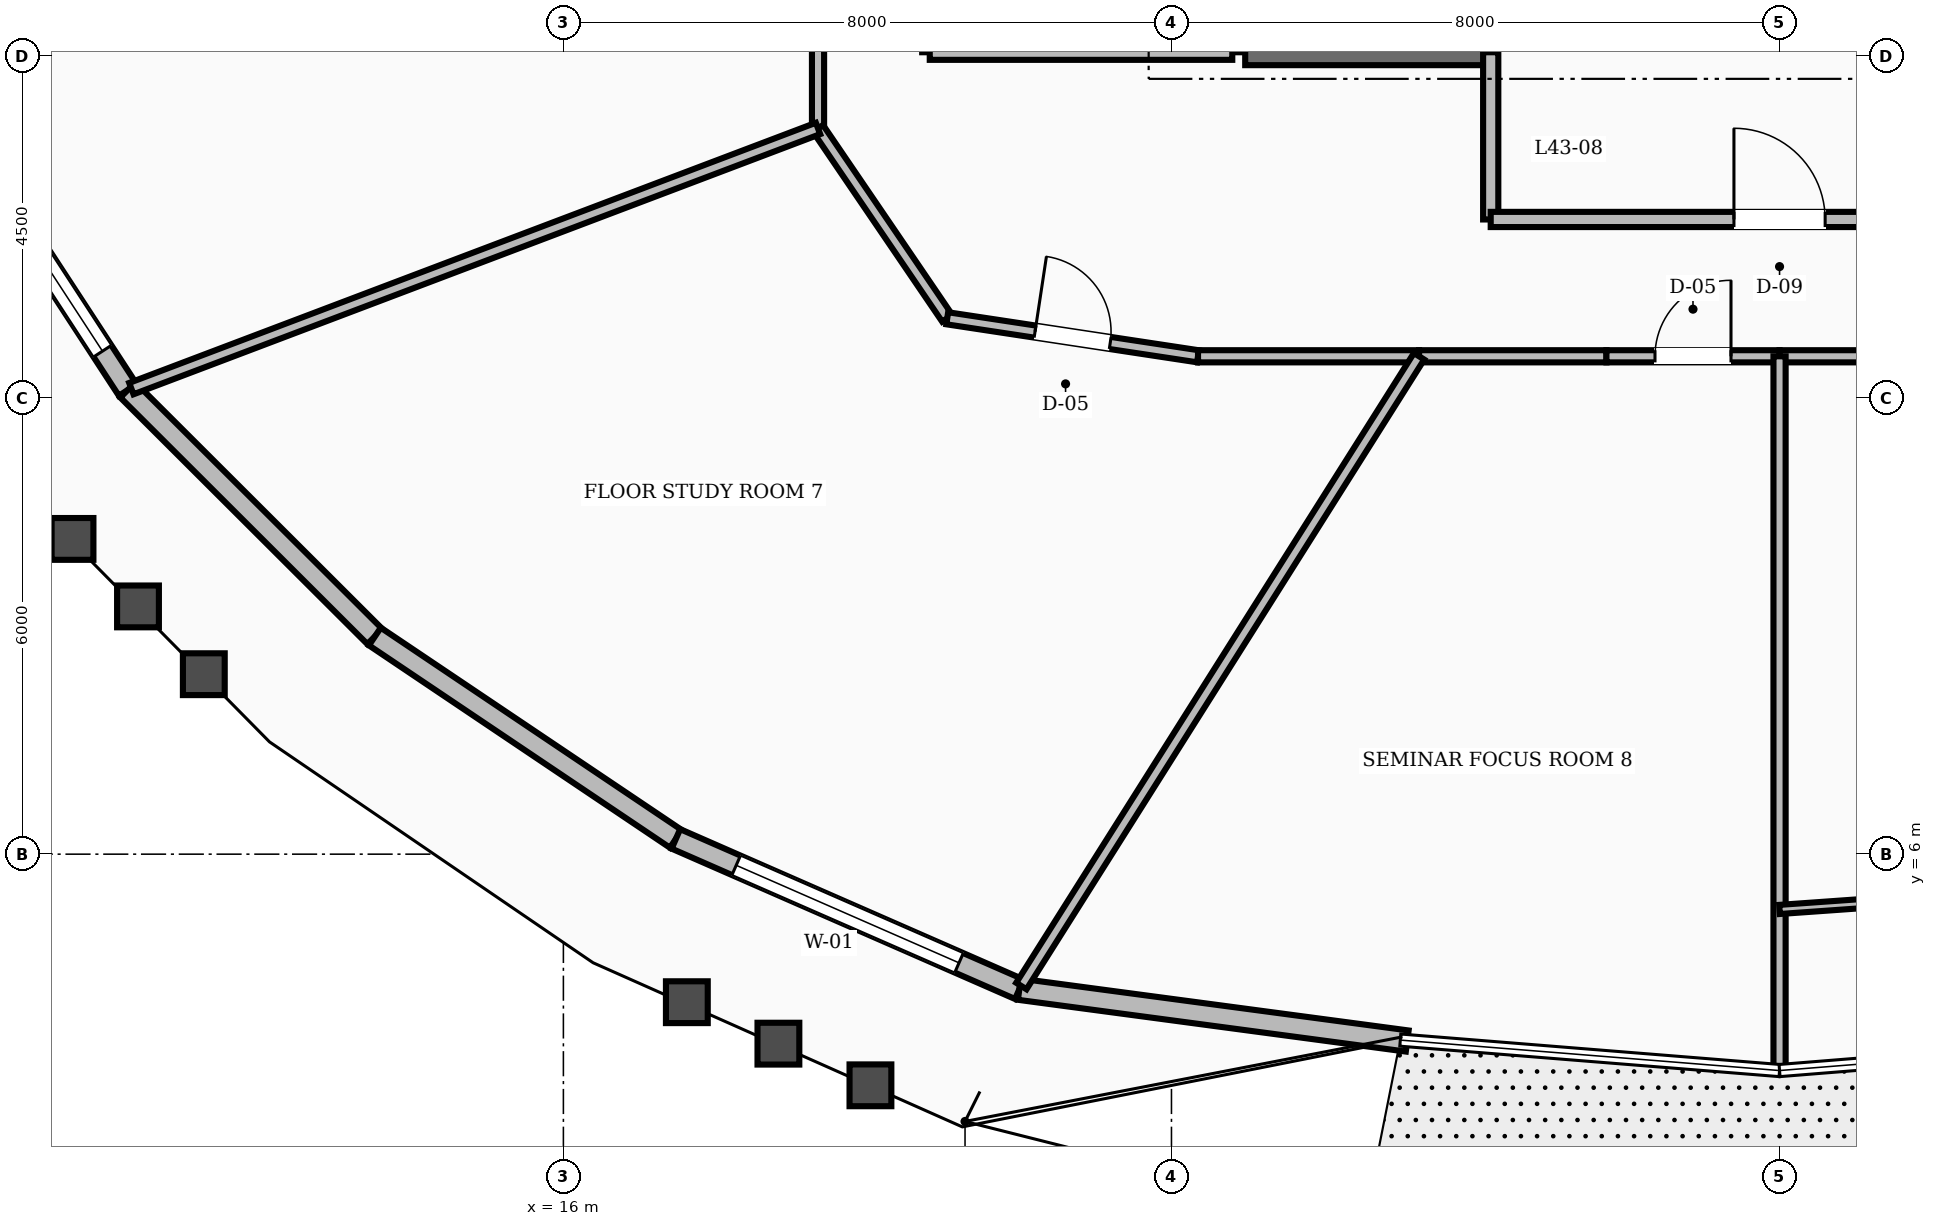
"""IFC4 building model, lengths in metres.
Left out: names, types, materials, properties, quantities, classifications, styles, units other than length and angle.
Written with IfcOpenShell. Run it as: python <this file> out.ifc"""

import sys

from ifc_helpers import new_model, si_unit, direction, frame, frame_2d, origin, place, context, subcontext, project, spatial, rectangle, extrude, element, fill, save


model = new_model("IFC4")
c1 = context("Model", 3, precision=1e-05, world=origin(), true_north=direction((0.0, 1.0)))
c2 = subcontext(c1, "Body", "Model", "MODEL_VIEW")
j1 = project(units=[si_unit("LENGTHUNIT", "METRE"), si_unit("PLANEANGLEUNIT", "RADIAN")], contexts=[c1])
p1 = place(None, origin())
s1 = spatial("IfcSite", under=j1, at=p1, CompositionType="ELEMENT")
p2 = place(p1, origin())
s2 = spatial("IfcBuilding", under=s1, at=p2, CompositionType="ELEMENT")
p3 = place(p2, frame((0.0, 0.0, 167.6)))
s3 = spatial("IfcBuildingStorey", under=s2, at=p3, CompositionType="ELEMENT", Elevation=167.6)
p4 = place(p3, frame((24.97, 16.55, 0.0), z_axis=(0.0, 0.0, 1.0), x_axis=(1.0, 0.0, 0.0)))
e1 = element("IfcWall", 1, at=p4, inside=s3, PredefinedType="SHEAR", context=c2, shape_type="SweptSolid", body=[
    extrude(rectangle(XDim=3.23, YDim=0.34, at=frame_2d((1.615, 0.0))), origin(), (0.0, 0.0, 1.0), 3.6),
])
p5 = place(p3, frame((7.854, 15.808, 0.0), z_axis=(0.0, 0.0, 1.0), x_axis=(0.546488523779, -0.837466592395, 0.0)))
e2 = element("IfcWall", 2, at=p5, inside=s3, PredefinedType="STANDARD", context=c2, shape_type="SweptSolid", body=[
    extrude(rectangle(XDim=4.419, YDim=0.28, at=frame_2d((2.209, 0.0))), origin(), (0.0, 0.0, 1.0), 2.82),
])
p6 = place(p5, frame((0.61, 0.0, 0.8)))
e3 = element("IfcOpeningElement", 3, at=p6, cuts=e2, PredefinedType="OPENING", context=c2, shape_type="SweptSolid", body=[
    extrude(rectangle(XDim=3.2, YDim=1.65, at=frame_2d((1.6, 0.825))), frame((0.0, 0.15, 0.0), z_axis=(0.0, -1.0, 0.0), x_axis=(1.0, 0.0, 0.0)), (0.0, 0.0, 1.0), 0.3),
])
p7 = place(p3, frame((10.269, 12.107, 0.0), z_axis=(0.0, 0.0, 1.0), x_axis=(0.707797600077, -0.706415286729, 0.0)))
e4 = element("IfcWall", 4, at=p7, inside=s3, PredefinedType="STANDARD", context=c2, shape_type="SweptSolid", body=[
    extrude(rectangle(XDim=4.592, YDim=0.28, at=frame_2d((2.296, 0.0))), origin(), (0.0, 0.0, 1.0), 2.82),
])
p8 = place(p3, frame((13.52, 8.863, 0.0), z_axis=(0.0, 0.0, 1.0), x_axis=(0.829911180813, -0.557895538575, 0.0)))
e5 = element("IfcWall", 5, at=p8, inside=s3, PredefinedType="STANDARD", context=c2, shape_type="SweptSolid", body=[
    extrude(rectangle(XDim=4.772, YDim=0.28, at=frame_2d((2.386, 0.0))), origin(), (0.0, 0.0, 1.0), 2.82),
])
p9 = place(p3, frame((17.48, 6.201, 0.0), z_axis=(0.0, 0.0, 1.0), x_axis=(0.916070979736, -0.401016159381, 0.0)))
e6 = element("IfcWall", 6, at=p9, inside=s3, PredefinedType="STANDARD", context=c2, shape_type="SweptSolid", body=[
    extrude(rectangle(XDim=4.933, YDim=0.28, at=frame_2d((2.466, 0.0))), origin(), (0.0, 0.0, 1.0), 2.82),
])
p10 = place(p9, frame((0.866, 0.0, 0.8)))
e7 = element("IfcOpeningElement", 7, at=p10, cuts=e6, PredefinedType="OPENING", context=c2, shape_type="SweptSolid", body=[
    extrude(rectangle(XDim=3.2, YDim=1.65, at=frame_2d((1.6, 0.825))), frame((0.0, 0.15, 0.0), z_axis=(0.0, -1.0, 0.0), x_axis=(1.0, 0.0, 0.0)), (0.0, 0.0, 1.0), 0.3),
])
p11 = place(p3, frame((21.999, 4.223, 0.0), z_axis=(0.0, 0.0, 1.0), x_axis=(0.991209668923, -0.13230038637, 0.0)))
e8 = element("IfcWall", 8, at=p11, inside=s3, PredefinedType="STANDARD", context=c2, shape_type="SweptSolid", body=[
    extrude(rectangle(XDim=5.148, YDim=0.28, at=frame_2d((2.574, 0.0))), origin(), (0.0, 0.0, 1.0), 2.82),
])
p12 = place(p3, frame((20.82, 16.55, 0.0), z_axis=(0.0, 0.0, 1.0), x_axis=(1.0, 0.0, 0.0)))
e9 = element("IfcWall", 9, at=p12, inside=s3, PredefinedType="SOLIDWALL", context=c2, shape_type="SweptSolid", body=[
    extrude(rectangle(XDim=3.98, YDim=0.2, at=frame_2d((1.99, 0.0))), origin(), (0.0, 0.0, 1.0), 2.8),
])
p13 = place(p3, frame((28.2, 14.35, 0.0), z_axis=(0.0, 0.0, 1.0), x_axis=(0.0, 1.0, 0.0)))
e10 = element("IfcWall", 10, at=p13, inside=s3, PredefinedType="SOLIDWALL", context=c2, shape_type="SweptSolid", body=[
    extrude(rectangle(XDim=2.2, YDim=0.2, at=frame_2d((1.1, 0.0))), origin(), (0.0, 0.0, 1.0), 2.8),
])
p14 = place(p3, frame((28.2, 14.35, 0.0), z_axis=(0.0, 0.0, 1.0), x_axis=(1.0, 0.0, 0.0)))
e11 = element("IfcWall", 11, at=p14, inside=s3, PredefinedType="SOLIDWALL", context=c2, shape_type="SweptSolid", body=[
    extrude(rectangle(XDim=7.6, YDim=0.2, at=frame_2d((3.8, 0.0))), origin(), (0.0, 0.0, 1.0), 2.8),
])
p15 = place(p14, frame((3.2, 0.0, 0.0)))
e12 = element("IfcOpeningElement", 12, at=p15, cuts=e11, PredefinedType="OPENING", context=c2, shape_type="SweptSolid", body=[
    extrude(rectangle(XDim=1.2, YDim=2.1, at=frame_2d((0.6, 1.05))), frame((0.0, 0.11, 0.0), z_axis=(0.0, -1.0, 0.0), x_axis=(1.0, 0.0, 0.0)), (0.0, 0.0, 1.0), 0.22),
])
p16 = place(p3, frame((19.35, 18.76, 0.0), z_axis=(0.0, 0.0, 1.0), x_axis=(0.0, -1.0, 0.0)))
e13 = element("IfcWall", 13, at=p16, inside=s3, PredefinedType="SOLIDWALL", context=c2, shape_type="SweptSolid", body=[
    extrude(rectangle(XDim=3.213, YDim=0.16, at=frame_2d((1.606, 0.0))), origin(), (0.0, 0.0, 1.0), 2.8),
])
p17 = place(p3, frame((19.35, 15.548, 0.0), z_axis=(0.0, 0.0, 1.0), x_axis=(0.562674669208, -0.826678423955, 0.0)))
e14 = element("IfcWall", 14, at=p17, inside=s3, PredefinedType="SOLIDWALL", context=c2, shape_type="SweptSolid", body=[
    extrude(rectangle(XDim=3.021, YDim=0.16, at=frame_2d((1.511, 0.0))), origin(), (0.0, 0.0, 1.0), 2.8),
])
p18 = place(p3, frame((21.05, 13.05, 0.0), z_axis=(0.0, 0.0, 1.0), x_axis=(0.988710906508, -0.149835721217, 0.0)))
e15 = element("IfcWall", 15, at=p18, inside=s3, PredefinedType="SOLIDWALL", context=c2, shape_type="SweptSolid", body=[
    extrude(rectangle(XDim=3.337, YDim=0.16, at=frame_2d((1.668, 0.0))), origin(), (0.0, 0.0, 1.0), 2.8),
])
p19 = place(p18, frame((1.168, 0.0, 0.0)))
e16 = element("IfcOpeningElement", 16, at=p19, cuts=e15, PredefinedType="OPENING", context=c2, shape_type="SweptSolid", body=[
    extrude(rectangle(XDim=1.0, YDim=2.1, at=frame_2d((0.5, 1.05))), frame((0.0, 0.09, 0.0), z_axis=(0.0, -1.0, 0.0), x_axis=(1.0, 0.0, 0.0)), (0.0, 0.0, 1.0), 0.18),
])
p20 = place(p3, frame((24.349, 12.55, 0.0), z_axis=(0.0, 0.0, 1.0), x_axis=(1.0, 0.0, 0.0)))
e17 = element("IfcWall", 17, at=p20, inside=s3, PredefinedType="SOLIDWALL", context=c2, shape_type="SweptSolid", body=[
    extrude(rectangle(XDim=2.908, YDim=0.16, at=frame_2d((1.454, 0.0))), origin(), (0.0, 0.0, 1.0), 2.8),
])
p21 = place(p3, frame((27.257, 12.55, 0.0), z_axis=(0.0, 0.0, 1.0), x_axis=(1.0, 0.0, 0.0)))
e18 = element("IfcWall", 18, at=p21, inside=s3, PredefinedType="SOLIDWALL", context=c2, shape_type="SweptSolid", body=[
    extrude(rectangle(XDim=2.465, YDim=0.16, at=frame_2d((1.232, 0.0))), origin(), (0.0, 0.0, 1.0), 2.8),
])
p22 = place(p3, frame((29.722, 12.55, 0.0), z_axis=(0.0, 0.0, 1.0), x_axis=(1.0, 0.0, 0.0)))
e19 = element("IfcWall", 19, at=p22, inside=s3, PredefinedType="SOLIDWALL", context=c2, shape_type="SweptSolid", body=[
    extrude(rectangle(XDim=2.278, YDim=0.16, at=frame_2d((1.139, 0.0))), origin(), (0.0, 0.0, 1.0), 2.8),
])
p23 = place(p22, frame((0.639, 0.0, 0.0)))
e20 = element("IfcOpeningElement", 20, at=p23, cuts=e19, PredefinedType="OPENING", context=c2, shape_type="SweptSolid", body=[
    extrude(rectangle(XDim=1.0, YDim=2.1, at=frame_2d((0.5, 1.05))), frame((0.0, 0.09, 0.0), z_axis=(0.0, -1.0, 0.0), x_axis=(1.0, 0.0, 0.0)), (0.0, 0.0, 1.0), 0.18),
])
p24 = place(p3, frame((32.0, 12.55, 0.0), z_axis=(0.0, 0.0, 1.0), x_axis=(1.0, 0.0, 0.0)))
e21 = element("IfcWall", 21, at=p24, inside=s3, PredefinedType="SOLIDWALL", context=c2, shape_type="SweptSolid", body=[
    extrude(rectangle(XDim=2.278, YDim=0.16, at=frame_2d((1.139, 0.0))), origin(), (0.0, 0.0, 1.0), 2.8),
])
p25 = place(p3, frame((19.35, 15.548, 0.0), z_axis=(0.0, 0.0, 1.0), x_axis=(-0.935128365782, -0.354309101647, 0.0)))
e22 = element("IfcWall", 22, at=p25, inside=s3, PredefinedType="SOLIDWALL", context=c2, shape_type="SweptSolid", body=[
    extrude(rectangle(XDim=9.661, YDim=0.16, at=frame_2d((4.83, 0.0))), origin(), (0.0, 0.0, 1.0), 2.8),
])
p26 = place(p3, frame((27.257, 12.55, 0.0), z_axis=(0.0, 0.0, 1.0), x_axis=(-0.53396393122, -0.845507256122, 0.0)))
e23 = element("IfcWall", 23, at=p26, inside=s3, PredefinedType="SOLIDWALL", context=c2, shape_type="SweptSolid", body=[
    extrude(rectangle(XDim=9.799, YDim=0.16, at=frame_2d((4.899, 0.0))), origin(), (0.0, 0.0, 1.0), 2.8),
])
p27 = place(p3, frame((32.0, 12.55, 0.0), z_axis=(0.0, 0.0, 1.0), x_axis=(0.0, -1.0, 0.0)))
e24 = element("IfcWall", 24, at=p27, inside=s3, PredefinedType="SOLIDWALL", context=c2, shape_type="SweptSolid", body=[
    extrude(rectangle(XDim=9.347, YDim=0.16, at=frame_2d((4.673, 0.0))), origin(), (0.0, 0.0, 1.0), 2.8),
])
p28 = place(p3, frame((32.0, 5.273, 0.0), z_axis=(0.0, 0.0, 1.0), x_axis=(0.997497239471, 0.070705425875, 0.0)))
e25 = element("IfcWall", 25, at=p28, inside=s3, PredefinedType="PARTITIONING", context=c2, shape_type="SweptSolid", body=[
    extrude(rectangle(XDim=4.389, YDim=0.12, at=frame_2d((2.194, 0.0))), origin(), (0.0, 0.0, 1.0), 2.8),
])
p29 = place(p28, frame((1.719, 0.0, 0.0)))
e26 = element("IfcOpeningElement", 26, at=p29, cuts=e25, PredefinedType="OPENING", context=c2, shape_type="SweptSolid", body=[
    extrude(rectangle(XDim=0.95, YDim=2.1, at=frame_2d((0.475, 1.05))), frame((0.0, 0.07, 0.0), z_axis=(0.0, -1.0, 0.0), x_axis=(1.0, 0.0, 0.0)), (0.0, 0.0, 1.0), 0.14),
])
p30 = place(p6, origin())
e27 = element("IfcWindow", 27, at=p30, inside=s3, PartitioningType="SINGLE_PANEL", PredefinedType="WINDOW", context=c2, shape_type="SweptSolid", body=[
    extrude(rectangle(XDim=3.2, YDim=1.65, at=frame_2d((1.6, 0.825))), frame((0.0, 0.03, 0.0), z_axis=(0.0, -1.0, 0.0), x_axis=(1.0, 0.0, 0.0)), (0.0, 0.0, 1.0), 0.06),
])
fill(e3, e27)
p31 = place(p10, origin())
e28 = element("IfcWindow", 28, at=p31, inside=s3, PartitioningType="SINGLE_PANEL", PredefinedType="WINDOW", context=c2, shape_type="SweptSolid", body=[
    extrude(rectangle(XDim=3.2, YDim=1.65, at=frame_2d((1.6, 0.825))), frame((0.0, 0.03, 0.0), z_axis=(0.0, -1.0, 0.0), x_axis=(1.0, 0.0, 0.0)), (0.0, 0.0, 1.0), 0.06),
])
fill(e7, e28)
p32 = place(p15, origin())
e29 = element("IfcDoor", 29, at=p32, inside=s3, OperationType="SINGLE_SWING_LEFT", PredefinedType="DOOR", context=c2, shape_type="SweptSolid", body=[
    extrude(rectangle(XDim=1.2, YDim=2.1, at=frame_2d((0.6, 1.05))), frame((0.0, 0.025, 0.0), z_axis=(0.0, -1.0, 0.0), x_axis=(1.0, 0.0, 0.0)), (0.0, 0.0, 1.0), 0.05),
])
fill(e12, e29)
p33 = place(p19, origin())
e30 = element("IfcDoor", 30, at=p33, inside=s3, OperationType="SINGLE_SWING_LEFT", PredefinedType="DOOR", context=c2, shape_type="SweptSolid", body=[
    extrude(rectangle(XDim=1.0, YDim=2.1, at=frame_2d((0.5, 1.05))), frame((0.0, 0.025, 0.0), z_axis=(0.0, -1.0, 0.0), x_axis=(1.0, 0.0, 0.0)), (0.0, 0.0, 1.0), 0.05),
])
fill(e16, e30)
p34 = place(p23, origin())
e31 = element("IfcDoor", 31, at=p34, inside=s3, OperationType="SINGLE_SWING_RIGHT", PredefinedType="DOOR", context=c2, shape_type="SweptSolid", body=[
    extrude(rectangle(XDim=1.0, YDim=2.1, at=frame_2d((0.5, 1.05))), frame((0.0, 0.025, 0.0), z_axis=(0.0, -1.0, 0.0), x_axis=(1.0, 0.0, 0.0)), (0.0, 0.0, 1.0), 0.05),
])
fill(e20, e31)
save(model, sys.argv[1])
